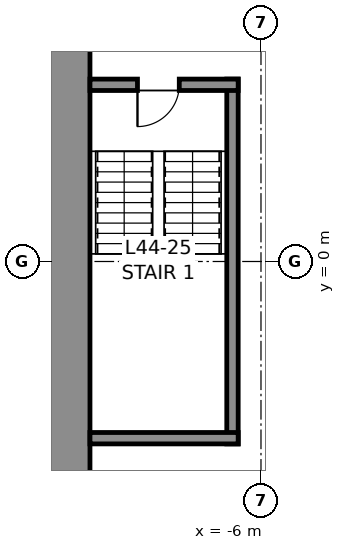
"""IFC4 building model, lengths in metres.
Left out: names, types, materials, properties, quantities, classifications, styles, units other than length and angle.
Written with IfcOpenShell. Run it as: python <this file> out.ifc"""

import sys

from ifc_helpers import new_model, si_unit, direction, frame, frame_2d, origin, place, context, subcontext, project, spatial, rectangle, extrude, element, fill, save


model = new_model("IFC4")
c1 = context("Model", 3, precision=1e-05, world=origin(), true_north=direction((0.0, 1.0)))
c2 = subcontext(c1, "Body", "Model", "MODEL_VIEW")
j1 = project(units=[si_unit("LENGTHUNIT", "METRE"), si_unit("PLANEANGLEUNIT", "RADIAN")], contexts=[c1])
p1 = place(None, origin())
s1 = spatial("IfcSite", under=j1, at=p1, CompositionType="ELEMENT")
p2 = place(p1, origin())
s2 = spatial("IfcBuilding", under=s1, at=p2, CompositionType="ELEMENT")
p3 = place(p2, frame((0.0, 0.0, 205.8)))
s3 = spatial("IfcBuildingStorey", under=s2, at=p3, CompositionType="ELEMENT", Elevation=205.8)
p4 = place(p3, frame((-11.25, -10.5, 0.0), z_axis=(0.0, 0.0, 1.0), x_axis=(0.0, 1.0, 0.0)))
e1 = element("IfcWall", 1, at=p4, inside=s3, PredefinedType="SHEAR", context=c2, shape_type="SweptSolid", body=[
    extrude(rectangle(XDim=21.0, YDim=1.5, at=frame_2d((10.5, 0.0))), origin(), (0.0, 0.0, 1.0), 4.0),
])
p5 = place(p4, frame((16.1, 0.0, 0.0)))
e2 = element("IfcOpeningElement", 2, at=p5, cuts=e1, PredefinedType="OPENING", context=c2, shape_type="SweptSolid", body=[
    extrude(rectangle(XDim=1.2, YDim=2.3, at=frame_2d((0.6, 1.15))), frame((0.0, 0.76, 0.0), z_axis=(0.0, -1.0, 0.0), x_axis=(1.0, 0.0, 0.0)), (0.0, 0.0, 1.0), 1.52),
])
p6 = place(p4, frame((3.7, 0.0, 0.0)))
e3 = element("IfcOpeningElement", 3, at=p6, cuts=e1, PredefinedType="OPENING", context=c2, shape_type="SweptSolid", body=[
    extrude(rectangle(XDim=1.2, YDim=2.3, at=frame_2d((0.6, 1.15))), frame((0.0, 0.76, 0.0), z_axis=(0.0, -1.0, 0.0), x_axis=(1.0, 0.0, 0.0)), (0.0, 0.0, 1.0), 1.52),
])
p7 = place(p3, frame((-6.75, -4.8, 0.0), z_axis=(0.0, 0.0, 1.0), x_axis=(0.0, 1.0, 0.0)))
e4 = element("IfcWall", 4, at=p7, inside=s3, PredefinedType="SOLIDWALL", context=c2, shape_type="SweptSolid", body=[
    extrude(rectangle(XDim=9.6, YDim=0.3, at=frame_2d((4.8, 0.0))), origin(), (0.0, 0.0, 1.0), 3.75),
])
p8 = place(p3, frame((-10.5, 4.65, 0.0), z_axis=(0.0, 0.0, 1.0), x_axis=(1.0, 0.0, 0.0)))
e5 = element("IfcWall", 5, at=p8, inside=s3, PredefinedType="SOLIDWALL", context=c2, shape_type="SweptSolid", body=[
    extrude(rectangle(XDim=3.9, YDim=0.3, at=frame_2d((1.95, 0.0))), origin(), (0.0, 0.0, 1.0), 3.75),
])
p9 = place(p8, frame((1.25, 0.0, 0.0)))
e6 = element("IfcOpeningElement", 6, at=p9, cuts=e5, PredefinedType="OPENING", context=c2, shape_type="SweptSolid", body=[
    extrude(rectangle(XDim=1.1, YDim=2.3, at=frame_2d((0.55, 1.15))), frame((0.0, 0.16, 0.0), z_axis=(0.0, -1.0, 0.0), x_axis=(1.0, 0.0, 0.0)), (0.0, 0.0, 1.0), 0.32),
])
p10 = place(p3, frame((-6.6, -4.65, 0.0), z_axis=(0.0, 0.0, 1.0), x_axis=(-1.0, 0.0, 0.0)))
e7 = element("IfcWall", 7, at=p10, inside=s3, PredefinedType="SOLIDWALL", context=c2, shape_type="SweptSolid", body=[
    extrude(rectangle(XDim=3.9, YDim=0.3, at=frame_2d((1.95, 0.0))), origin(), (0.0, 0.0, 1.0), 3.75),
])
p11 = place(p9, frame((1.1, 0.0, 0.0), z_axis=(0.0, 0.0, 1.0), x_axis=(-1.0, 0.0, 0.0)))
e8 = element("IfcDoor", 8, at=p11, inside=s3, OperationType="SINGLE_SWING_RIGHT", PredefinedType="DOOR", context=c2, shape_type="SweptSolid", body=[
    extrude(rectangle(XDim=1.1, YDim=2.3, at=frame_2d((0.55, 1.15))), frame((0.0, 0.025, 0.0), z_axis=(0.0, -1.0, 0.0), x_axis=(1.0, 0.0, 0.0)), (0.0, 0.0, 1.0), 0.05),
])
fill(e6, e8)
save(model, sys.argv[1])
